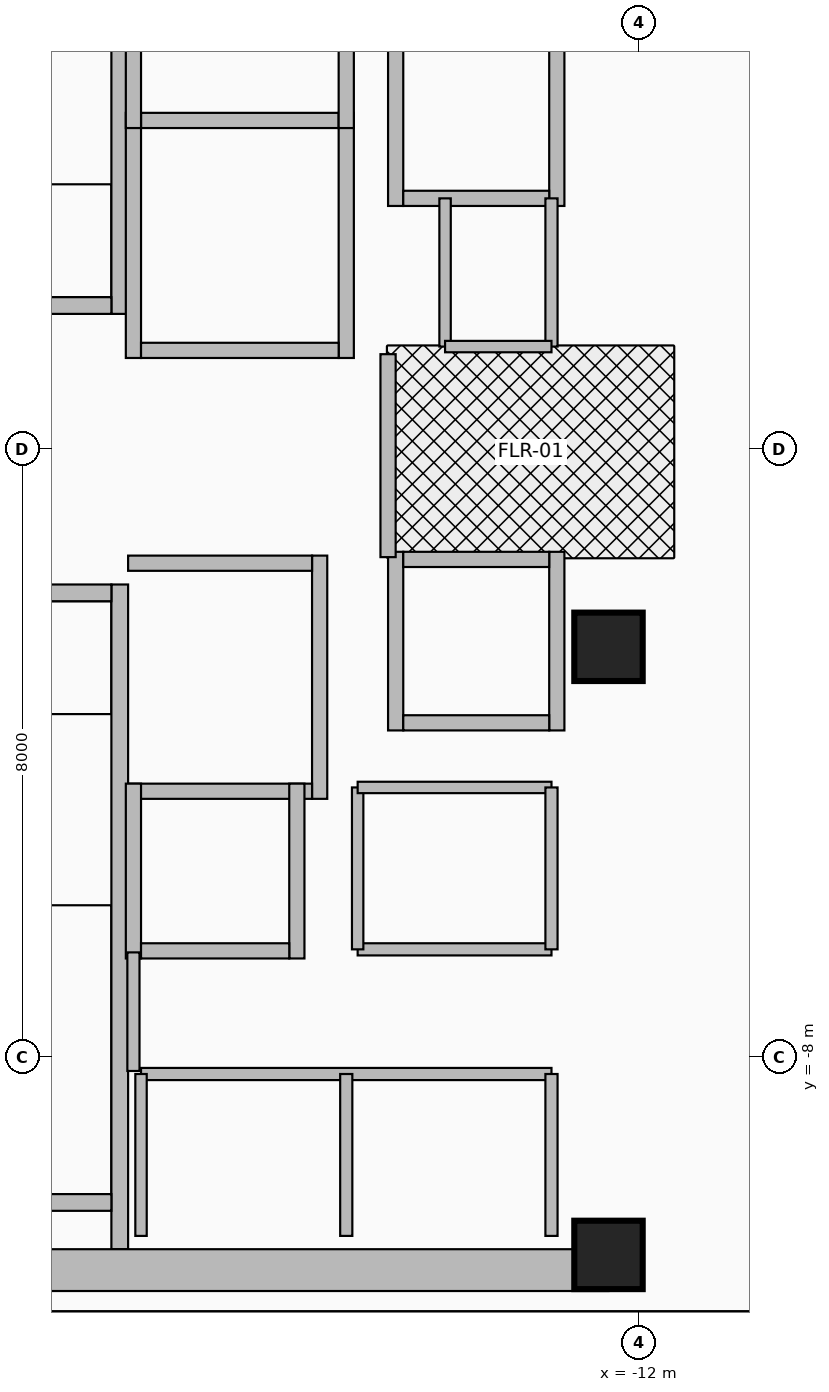
"""IFC4 building model, lengths in metres.
Left out: names, types, materials, properties, quantities, classifications, styles, units other than length and angle.
Written with IfcOpenShell. Run it as: python <this file> out.ifc"""

import sys

from ifc_helpers import new_model, si_unit, direction, frame, frame_2d, origin, origin_2d, place, context, subcontext, project, spatial, rectangle, extrude, source, transform, mapped, element, fill, save


model = new_model("IFC4")
c1 = context("Model", 3, precision=1e-05, world=origin(), true_north=direction((0.0, 1.0)))
c2 = subcontext(c1, "Body", "Model", "MODEL_VIEW")
j1 = project(units=[si_unit("LENGTHUNIT", "METRE"), si_unit("PLANEANGLEUNIT", "RADIAN")], contexts=[c1])
p1 = place(None, origin())
s1 = spatial("IfcSite", under=j1, at=p1, CompositionType="ELEMENT")
p2 = place(p1, origin())
s2 = spatial("IfcBuilding", under=s1, at=p2, CompositionType="ELEMENT")
p3 = place(p2, frame((0.0, 0.0, 209.0)))
s3 = spatial("IfcBuildingStorey", under=s2, at=p3, CompositionType="ELEMENT", Elevation=209.0)
p4 = place(p3, frame((-18.83, 1.78, 0.0), z_axis=(0.0, 0.0, 1.0), x_axis=(0.0, 1.0, 0.0)))
e1 = element("IfcWall", 1, at=p4, inside=s3, PredefinedType="SHEAR", context=c2, shape_type="SweptSolid", body=[
    extrude(rectangle(XDim=8.745, YDim=0.22, at=frame_2d((4.373, 0.0))), origin(), (0.0, 0.0, 1.0), 3.26),
])
p5 = place(p3, frame((-22.05, 1.89, 0.0), z_axis=(0.0, 0.0, 1.0), x_axis=(1.0, 0.0, 0.0)))
e2 = element("IfcWall", 2, at=p5, inside=s3, PredefinedType="SHEAR", context=c2, shape_type="SweptSolid", body=[
    extrude(rectangle(XDim=3.11, YDim=0.22, at=frame_2d((1.555, 0.0))), origin(), (0.0, 0.0, 1.0), 3.26),
])
p6 = place(p5, frame((1.0, 0.0, 0.0)))
e3 = element("IfcOpeningElement", 3, at=p6, cuts=e2, PredefinedType="OPENING", context=c2, shape_type="SweptSolid", body=[
    extrude(rectangle(XDim=1.1, YDim=2.15, at=frame_2d((0.55, 1.075))), frame((0.0, 0.125, 0.0), z_axis=(0.0, -1.0, 0.0), x_axis=(1.0, 0.0, 0.0)), (0.0, 0.0, 1.0), 0.25),
])
p7 = place(p3, frame((-18.83, -10.525, 0.0), z_axis=(0.0, 0.0, 1.0), x_axis=(0.0, 1.0, 0.0)))
e4 = element("IfcWall", 4, at=p7, inside=s3, PredefinedType="SHEAR", context=c2, shape_type="SweptSolid", body=[
    extrude(rectangle(XDim=8.745, YDim=0.22, at=frame_2d((4.373, 0.0))), origin(), (0.0, 0.0, 1.0), 3.26),
])
p8 = place(p3, frame((-22.05, -9.91, 0.0), z_axis=(0.0, 0.0, 1.0), x_axis=(1.0, 0.0, 0.0)))
e5 = element("IfcWall", 5, at=p8, inside=s3, PredefinedType="SHEAR", context=c2, shape_type="SweptSolid", body=[
    extrude(rectangle(XDim=3.11, YDim=0.22, at=frame_2d((1.555, 0.0))), origin(), (0.0, 0.0, 1.0), 3.26),
])
p9 = place(p3, frame((-22.05, -1.89, 0.0), z_axis=(0.0, 0.0, 1.0), x_axis=(1.0, 0.0, 0.0)))
e6 = element("IfcWall", 6, at=p9, inside=s3, PredefinedType="SHEAR", context=c2, shape_type="SweptSolid", body=[
    extrude(rectangle(XDim=3.11, YDim=0.22, at=frame_2d((1.555, 0.0))), origin(), (0.0, 0.0, 1.0), 3.26),
])
p10 = place(p9, frame((1.0, 0.0, 0.0)))
e7 = element("IfcOpeningElement", 7, at=p10, cuts=e6, PredefinedType="OPENING", context=c2, shape_type="SweptSolid", body=[
    extrude(rectangle(XDim=1.1, YDim=2.15, at=frame_2d((0.55, 1.075))), frame((0.0, 0.125, 0.0), z_axis=(0.0, -1.0, 0.0), x_axis=(1.0, 0.0, 0.0)), (0.0, 0.0, 1.0), 0.25),
])
p11 = place(p3, frame((-22.65, -10.8, 0.0), z_axis=(0.0, 0.0, 1.0), x_axis=(1.0, 0.0, 0.0)))
e8 = element("IfcWall", 8, at=p11, inside=s3, PredefinedType="SHEAR", context=c2, shape_type="SweptSolid", body=[
    extrude(rectangle(XDim=10.25, YDim=0.55, at=frame_2d((5.125, 0.0))), origin(), (0.0, 0.0, 1.0), 3.26),
])
m1 = source(origin(), c2, "Body", "SweptSolid", [
    extrude(rectangle(XDim=0.9, YDim=0.9, at=origin_2d()), origin(), (0.0, 0.0, 1.0), 3.5),
])
for number, where, z_axis, x_axis in (
    (9, (-12.4, -10.6, 0.0), (0.0, 0.0, 1.0), (1.0, 0.0, 0.0)),
    (10, (-12.4, -2.6, 0.0), (0.0, 0.0, 1.0), (1.0, 0.0, 0.0)),
):
    element("IfcColumn", number, at=place(p3, frame(where, z_axis=z_axis, x_axis=x_axis)), inside=s3, PredefinedType="COLUMN", context=c2, shape_type="MappedRepresentation", body=[
        mapped(m1, transform((0.0, 0.0, 0.0), x_axis=(1.0, 0.0, 0.0), y_axis=(0.0, 1.0, 0.0), z_axis=(0.0, 0.0, 1.0), scale=1.0)),
    ])
for number, where, z_axis, x_axis in (
    (11, (-18.65, 1.2, 0.0), (0.0, 0.0, 1.0), (0.0, 1.0, 0.0)),
    (12, (-15.85, 1.2, 0.0), (0.0, 0.0, 1.0), (0.0, 1.0, 0.0)),
):
    element("IfcWall", number, at=place(p3, frame(where, z_axis=z_axis, x_axis=x_axis)), inside=s3, PredefinedType="MOVABLE", context=c2, shape_type="SweptSolid", body=[
        extrude(rectangle(XDim=3.225, YDim=0.2, at=frame_2d((1.613, 0.0))), origin(), (0.0, 0.0, 1.0), 3.26),
    ])
p12 = place(p3, frame((-18.55, 1.3, 0.0), z_axis=(0.0, 0.0, 1.0), x_axis=(1.0, 0.0, 0.0)))
e13 = element("IfcWall", 13, at=p12, inside=s3, PredefinedType="MOVABLE", context=c2, shape_type="SweptSolid", body=[
    extrude(rectangle(XDim=2.6, YDim=0.2, at=frame_2d((1.3, 0.0))), origin(), (0.0, 0.0, 1.0), 3.26),
])
p13 = place(p12, frame((0.7, 0.0, 0.0)))
e14 = element("IfcOpeningElement", 14, at=p13, cuts=e13, PredefinedType="OPENING", context=c2, shape_type="SweptSolid", body=[
    extrude(rectangle(XDim=1.2, YDim=2.1, at=frame_2d((0.6, 1.05))), frame((0.0, 0.115, 0.0), z_axis=(0.0, -1.0, 0.0), x_axis=(1.0, 0.0, 0.0)), (0.0, 0.0, 1.0), 0.23),
])
p14 = place(p3, frame((-18.55, 4.325, 0.0), z_axis=(0.0, 0.0, 1.0), x_axis=(1.0, 0.0, 0.0)))
e15 = element("IfcWall", 15, at=p14, inside=s3, PredefinedType="MOVABLE", context=c2, shape_type="SweptSolid", body=[
    extrude(rectangle(XDim=2.6, YDim=0.2, at=frame_2d((1.3, 0.0))), origin(), (0.0, 0.0, 1.0), 3.26),
])
p15 = place(p3, frame((-16.2, -4.6, 0.0), z_axis=(0.0, 0.0, 1.0), x_axis=(0.0, 1.0, 0.0)))
e16 = element("IfcWall", 16, at=p15, inside=s3, PredefinedType="MOVABLE", context=c2, shape_type="SweptSolid", body=[
    extrude(rectangle(XDim=3.2, YDim=0.2, at=frame_2d((1.6, 0.0))), origin(), (0.0, 0.0, 1.0), 3.26),
])
p16 = place(p3, frame((-18.72, -4.5, 0.0), z_axis=(0.0, 0.0, 1.0), x_axis=(1.0, 0.0, 0.0)))
e17 = element("IfcWall", 17, at=p16, inside=s3, PredefinedType="MOVABLE", context=c2, shape_type="SweptSolid", body=[
    extrude(rectangle(XDim=2.42, YDim=0.2, at=frame_2d((1.21, 0.0))), origin(), (0.0, 0.0, 1.0), 3.26),
])
p17 = place(p3, frame((-18.72, -1.5, 0.0), z_axis=(0.0, 0.0, 1.0), x_axis=(1.0, 0.0, 0.0)))
e18 = element("IfcWall", 18, at=p17, inside=s3, PredefinedType="MOVABLE", context=c2, shape_type="SweptSolid", body=[
    extrude(rectangle(XDim=2.42, YDim=0.2, at=frame_2d((1.21, 0.0))), origin(), (0.0, 0.0, 1.0), 3.26),
])
p18 = place(p17, frame((0.61, 0.0, 0.0)))
e19 = element("IfcOpeningElement", 19, at=p18, cuts=e18, PredefinedType="OPENING", context=c2, shape_type="SweptSolid", body=[
    extrude(rectangle(XDim=1.2, YDim=2.1, at=frame_2d((0.6, 1.05))), frame((0.0, 0.115, 0.0), z_axis=(0.0, -1.0, 0.0), x_axis=(1.0, 0.0, 0.0)), (0.0, 0.0, 1.0), 0.23),
])
for number, where, z_axis, x_axis in (
    (20, (-18.65, 4.225, 0.0), (0.0, 0.0, 1.0), (0.0, 1.0, 0.0)),
    (21, (-15.85, 4.225, 0.0), (0.0, 0.0, 1.0), (0.0, 1.0, 0.0)),
):
    element("IfcWall", number, at=place(p3, frame(where, z_axis=z_axis, x_axis=x_axis)), inside=s3, PredefinedType="MOVABLE", context=c2, shape_type="SweptSolid", body=[
        extrude(rectangle(XDim=3.325, YDim=0.2, at=frame_2d((1.663, 0.0))), origin(), (0.0, 0.0, 1.0), 3.26),
    ])
p19 = place(p3, frame((-15.2, 3.2, 0.0), z_axis=(0.0, 0.0, 1.0), x_axis=(0.0, 1.0, 0.0)))
e22 = element("IfcWall", 22, at=p19, inside=s3, PredefinedType="MOVABLE", context=c2, shape_type="SweptSolid", body=[
    extrude(rectangle(XDim=2.25, YDim=0.2, at=frame_2d((1.125, 0.0))), origin(), (0.0, 0.0, 1.0), 3.26),
])
p20 = place(p3, frame((-13.08, 3.2, 0.0), z_axis=(0.0, 0.0, 1.0), x_axis=(0.0, 1.0, 0.0)))
e23 = element("IfcWall", 23, at=p20, inside=s3, PredefinedType="MOVABLE", context=c2, shape_type="SweptSolid", body=[
    extrude(rectangle(XDim=2.25, YDim=0.2, at=frame_2d((1.125, 0.0))), origin(), (0.0, 0.0, 1.0), 3.26),
])
p21 = place(p20, frame((0.575, 0.0, 0.0)))
e24 = element("IfcOpeningElement", 24, at=p21, cuts=e23, PredefinedType="OPENING", context=c2, shape_type="SweptSolid", body=[
    extrude(rectangle(XDim=1.1, YDim=2.1, at=frame_2d((0.55, 1.05))), frame((0.0, 0.115, 0.0), z_axis=(0.0, -1.0, 0.0), x_axis=(1.0, 0.0, 0.0)), (0.0, 0.0, 1.0), 0.23),
])
p22 = place(p3, frame((-15.1, 3.3, 0.0), z_axis=(0.0, 0.0, 1.0), x_axis=(1.0, 0.0, 0.0)))
e25 = element("IfcWall", 25, at=p22, inside=s3, PredefinedType="MOVABLE", context=c2, shape_type="SweptSolid", body=[
    extrude(rectangle(XDim=1.92, YDim=0.2, at=frame_2d((0.96, 0.0))), origin(), (0.0, 0.0, 1.0), 3.26),
])
for number, where, z_axis, x_axis in (
    (26, (-18.65, -6.7, 0.0), (0.0, 0.0, 1.0), (0.0, 1.0, 0.0)),
    (27, (-16.5, -6.7, 0.0), (0.0, 0.0, 1.0), (0.0, 1.0, 0.0)),
):
    element("IfcWall", number, at=place(p3, frame(where, z_axis=z_axis, x_axis=x_axis)), inside=s3, PredefinedType="MOVABLE", context=c2, shape_type="SweptSolid", body=[
        extrude(rectangle(XDim=2.3, YDim=0.2, at=frame_2d((1.15, 0.0))), origin(), (0.0, 0.0, 1.0), 3.26),
    ])
p23 = place(p3, frame((-18.55, -6.6, 0.0), z_axis=(0.0, 0.0, 1.0), x_axis=(1.0, 0.0, 0.0)))
e28 = element("IfcWall", 28, at=p23, inside=s3, PredefinedType="MOVABLE", context=c2, shape_type="SweptSolid", body=[
    extrude(rectangle(XDim=1.95, YDim=0.2, at=frame_2d((0.975, 0.0))), origin(), (0.0, 0.0, 1.0), 3.26),
])
p24 = place(p23, frame((0.425, 0.0, 0.0)))
e29 = element("IfcOpeningElement", 29, at=p24, cuts=e28, PredefinedType="OPENING", context=c2, shape_type="SweptSolid", body=[
    extrude(rectangle(XDim=1.1, YDim=2.1, at=frame_2d((0.55, 1.05))), frame((0.0, 0.115, 0.0), z_axis=(0.0, -1.0, 0.0), x_axis=(1.0, 0.0, 0.0)), (0.0, 0.0, 1.0), 0.23),
])
for number, where, z_axis, x_axis in (
    (30, (-15.2, -3.7, 0.0), (0.0, 0.0, 1.0), (0.0, 1.0, 0.0)),
    (31, (-13.08, -3.7, 0.0), (0.0, 0.0, 1.0), (0.0, 1.0, 0.0)),
):
    element("IfcWall", number, at=place(p3, frame(where, z_axis=z_axis, x_axis=x_axis)), inside=s3, PredefinedType="MOVABLE", context=c2, shape_type="SweptSolid", body=[
        extrude(rectangle(XDim=2.35, YDim=0.2, at=frame_2d((1.175, 0.0))), origin(), (0.0, 0.0, 1.0), 3.26),
    ])
p25 = place(p3, frame((-15.1, -3.6, 0.0), z_axis=(0.0, 0.0, 1.0), x_axis=(1.0, 0.0, 0.0)))
e32 = element("IfcWall", 32, at=p25, inside=s3, PredefinedType="MOVABLE", context=c2, shape_type="SweptSolid", body=[
    extrude(rectangle(XDim=1.92, YDim=0.2, at=frame_2d((0.96, 0.0))), origin(), (0.0, 0.0, 1.0), 3.26),
])
p26 = place(p3, frame((-15.1, -1.45, 0.0), z_axis=(0.0, 0.0, 1.0), x_axis=(1.0, 0.0, 0.0)))
e33 = element("IfcWall", 33, at=p26, inside=s3, PredefinedType="MOVABLE", context=c2, shape_type="SweptSolid", body=[
    extrude(rectangle(XDim=1.92, YDim=0.2, at=frame_2d((0.96, 0.0))), origin(), (0.0, 0.0, 1.0), 3.26),
])
p27 = place(p26, frame((0.41, 0.0, 0.0)))
e34 = element("IfcOpeningElement", 34, at=p27, cuts=e33, PredefinedType="OPENING", context=c2, shape_type="SweptSolid", body=[
    extrude(rectangle(XDim=1.1, YDim=2.1, at=frame_2d((0.55, 1.05))), frame((0.0, 0.115, 0.0), z_axis=(0.0, -1.0, 0.0), x_axis=(1.0, 0.0, 0.0)), (0.0, 0.0, 1.0), 0.23),
])
p28 = place(p3, frame((-15.3, -1.42, 0.0), z_axis=(0.0, 0.0, 1.0), x_axis=(0.0, 1.0, 0.0)))
e35 = element("IfcWall", 35, at=p28, inside=s3, PredefinedType="PARTITIONING", context=c2, shape_type="SweptSolid", body=[
    extrude(rectangle(XDim=2.67, YDim=0.2, at=frame_2d((1.335, 0.0))), origin(), (0.0, 0.0, 1.0), 3.26),
])
p29 = place(p28, frame((0.78, 0.0, 0.0)))
e36 = element("IfcOpeningElement", 36, at=p29, cuts=e35, PredefinedType="OPENING", context=c2, shape_type="SweptSolid", body=[
    extrude(rectangle(XDim=1.05, YDim=2.15, at=frame_2d((0.525, 1.075))), frame((0.0, 0.115, 0.0), z_axis=(0.0, -1.0, 0.0), x_axis=(1.0, 0.0, 0.0)), (0.0, 0.0, 1.0), 0.23),
])
p30 = place(p3, frame((-18.65, -8.18, 0.0), z_axis=(0.0, 0.0, 1.0), x_axis=(0.0, 1.0, 0.0)))
e37 = element("IfcWall", 37, at=p30, inside=s3, PredefinedType="PARTITIONING", context=c2, shape_type="SweptSolid", body=[
    extrude(rectangle(XDim=1.56, YDim=0.16, at=frame_2d((0.78, 0.0))), origin(), (0.0, 0.0, 1.0), 3.26),
])
p31 = place(p3, frame((-18.55, -8.22, 0.0), z_axis=(0.0, 0.0, 1.0), x_axis=(1.0, 0.0, 0.0)))
e38 = element("IfcWall", 38, at=p31, inside=s3, PredefinedType="PARTITIONING", context=c2, shape_type="SweptSolid", body=[
    extrude(rectangle(XDim=5.4, YDim=0.16, at=frame_2d((2.7, 0.0))), origin(), (0.0, 0.0, 1.0), 3.26),
])
p32 = place(p31, frame((0.35, 0.0, 0.0)))
e39 = element("IfcOpeningElement", 39, at=p32, cuts=e38, PredefinedType="OPENING", context=c2, shape_type="SweptSolid", body=[
    extrude(rectangle(XDim=0.85, YDim=2.05, at=frame_2d((0.425, 1.025))), frame((0.0, 0.095, 0.0), z_axis=(0.0, -1.0, 0.0), x_axis=(1.0, 0.0, 0.0)), (0.0, 0.0, 1.0), 0.19),
])
p33 = place(p31, frame((3.05, 0.0, 0.0)))
e40 = element("IfcOpeningElement", 40, at=p33, cuts=e38, PredefinedType="OPENING", context=c2, shape_type="SweptSolid", body=[
    extrude(rectangle(XDim=0.85, YDim=2.05, at=frame_2d((0.425, 1.025))), frame((0.0, 0.095, 0.0), z_axis=(0.0, -1.0, 0.0), x_axis=(1.0, 0.0, 0.0)), (0.0, 0.0, 1.0), 0.19),
])
p34 = place(p3, frame((-18.55, -10.35, 0.0), z_axis=(0.0, 0.0, 1.0), x_axis=(0.0, 1.0, 0.0)))
e41 = element("IfcWall", 41, at=p34, inside=s3, PredefinedType="PARTITIONING", context=c2, shape_type="SweptSolid", body=[
    extrude(rectangle(XDim=2.13, YDim=0.15, at=frame_2d((1.065, 0.0))), origin(), (0.0, 0.0, 1.0), 3.26),
])
for number, where, z_axis, x_axis in (
    (42, (-13.15, -10.35, 0.0), (0.0, 0.0, 1.0), (0.0, 1.0, 0.0)),
    (43, (-15.85, -10.35, 0.0), (0.0, 0.0, 1.0), (0.0, 1.0, 0.0)),
):
    element("IfcWall", number, at=place(p3, frame(where, z_axis=z_axis, x_axis=x_axis)), inside=s3, PredefinedType="PARTITIONING", context=c2, shape_type="SweptSolid", body=[
        extrude(rectangle(XDim=2.13, YDim=0.16, at=frame_2d((1.065, 0.0))), origin(), (0.0, 0.0, 1.0), 3.26),
    ])
p35 = place(p3, frame((-15.7, -6.58, 0.0), z_axis=(0.0, 0.0, 1.0), x_axis=(1.0, 0.0, 0.0)))
e44 = element("IfcWall", 44, at=p35, inside=s3, PredefinedType="PARTITIONING", context=c2, shape_type="SweptSolid", body=[
    extrude(rectangle(XDim=2.55, YDim=0.16, at=frame_2d((1.275, 0.0))), origin(), (0.0, 0.0, 1.0), 3.26),
])
p36 = place(p35, frame((0.5, 0.0, 0.0)))
e45 = element("IfcOpeningElement", 45, at=p36, cuts=e44, PredefinedType="OPENING", context=c2, shape_type="SweptSolid", body=[
    extrude(rectangle(XDim=0.85, YDim=2.05, at=frame_2d((0.425, 1.025))), frame((0.0, 0.095, 0.0), z_axis=(0.0, -1.0, 0.0), x_axis=(1.0, 0.0, 0.0)), (0.0, 0.0, 1.0), 0.19),
])
p37 = place(p3, frame((-15.7, -6.58, 0.0), z_axis=(0.0, 0.0, 1.0), x_axis=(0.0, 1.0, 0.0)))
e46 = element("IfcWall", 46, at=p37, inside=s3, PredefinedType="PARTITIONING", context=c2, shape_type="SweptSolid", body=[
    extrude(rectangle(XDim=2.13, YDim=0.15, at=frame_2d((1.065, 0.0))), origin(), (0.0, 0.0, 1.0), 3.26),
])
p38 = place(p3, frame((-15.7, -4.45, 0.0), z_axis=(0.0, 0.0, 1.0), x_axis=(1.0, 0.0, 0.0)))
e47 = element("IfcWall", 47, at=p38, inside=s3, PredefinedType="PARTITIONING", context=c2, shape_type="SweptSolid", body=[
    extrude(rectangle(XDim=2.55, YDim=0.15, at=frame_2d((1.275, 0.0))), origin(), (0.0, 0.0, 1.0), 3.26),
])
p39 = place(p3, frame((-13.15, -6.58, 0.0), z_axis=(0.0, 0.0, 1.0), x_axis=(0.0, 1.0, 0.0)))
e48 = element("IfcWall", 48, at=p39, inside=s3, PredefinedType="PARTITIONING", context=c2, shape_type="SweptSolid", body=[
    extrude(rectangle(XDim=2.13, YDim=0.16, at=frame_2d((1.065, 0.0))), origin(), (0.0, 0.0, 1.0), 3.26),
])
p40 = place(p3, frame((-13.15, 1.35, 0.0), z_axis=(0.0, 0.0, 1.0), x_axis=(0.0, 1.0, 0.0)))
e49 = element("IfcWall", 49, at=p40, inside=s3, PredefinedType="PARTITIONING", context=c2, shape_type="SweptSolid", body=[
    extrude(rectangle(XDim=1.95, YDim=0.16, at=frame_2d((0.975, 0.0))), origin(), (0.0, 0.0, 1.0), 3.26),
])
p41 = place(p3, frame((-14.55, 1.35, 0.0), z_axis=(0.0, 0.0, 1.0), x_axis=(0.0, 1.0, 0.0)))
e50 = element("IfcWall", 50, at=p41, inside=s3, PredefinedType="PARTITIONING", context=c2, shape_type="SweptSolid", body=[
    extrude(rectangle(XDim=1.95, YDim=0.15, at=frame_2d((0.975, 0.0))), origin(), (0.0, 0.0, 1.0), 3.26),
])
p42 = place(p3, frame((-14.55, 1.35, 0.0), z_axis=(0.0, 0.0, 1.0), x_axis=(1.0, 0.0, 0.0)))
e51 = element("IfcWall", 51, at=p42, inside=s3, PredefinedType="PARTITIONING", context=c2, shape_type="SweptSolid", body=[
    extrude(rectangle(XDim=1.4, YDim=0.15, at=frame_2d((0.7, 0.0))), origin(), (0.0, 0.0, 1.0), 3.26),
])
p43 = place(p42, frame((0.275, 0.0, 0.0)))
e52 = element("IfcOpeningElement", 52, at=p43, cuts=e51, PredefinedType="OPENING", context=c2, shape_type="SweptSolid", body=[
    extrude(rectangle(XDim=0.85, YDim=2.05, at=frame_2d((0.425, 1.025))), frame((0.0, 0.09, 0.0), z_axis=(0.0, -1.0, 0.0), x_axis=(1.0, 0.0, 0.0)), (0.0, 0.0, 1.0), 0.18),
])
p44 = place(p3, frame((-23.45, -11.42, 0.0), z_axis=(0.0, 0.0, 1.0), x_axis=(1.0, 0.0, 0.0)))
e53 = element("IfcWall", 53, at=p44, inside=s3, PredefinedType="PARTITIONING", context=c2, shape_type="SweptSolid", body=[
    extrude(rectangle(XDim=13.84, YDim=0.16, at=frame_2d((6.92, 0.0))), origin(), (0.0, 0.0, 1.0), 2.634),
])
p45 = place(p13, origin())
e54 = element("IfcDoor", 54, at=p45, inside=s3, OperationType="DOUBLE_DOOR_SLIDING", PredefinedType="DOOR", context=c2, shape_type="SweptSolid", body=[
    extrude(rectangle(XDim=1.2, YDim=2.1, at=frame_2d((0.6, 1.05))), frame((0.0, 0.025, 0.0), z_axis=(0.0, -1.0, 0.0), x_axis=(1.0, 0.0, 0.0)), (0.0, 0.0, 1.0), 0.05),
])
fill(e14, e54)
p46 = place(p18, origin())
e55 = element("IfcDoor", 55, at=p46, inside=s3, OperationType="DOUBLE_DOOR_SLIDING", PredefinedType="DOOR", context=c2, shape_type="SweptSolid", body=[
    extrude(rectangle(XDim=1.2, YDim=2.1, at=frame_2d((0.6, 1.05))), frame((0.0, 0.025, 0.0), z_axis=(0.0, -1.0, 0.0), x_axis=(1.0, 0.0, 0.0)), (0.0, 0.0, 1.0), 0.05),
])
fill(e19, e55)
p47 = place(p21, origin())
e56 = element("IfcDoor", 56, at=p47, inside=s3, OperationType="DOUBLE_DOOR_SLIDING", PredefinedType="DOOR", context=c2, shape_type="SweptSolid", body=[
    extrude(rectangle(XDim=1.1, YDim=2.1, at=frame_2d((0.55, 1.05))), frame((0.0, 0.025, 0.0), z_axis=(0.0, -1.0, 0.0), x_axis=(1.0, 0.0, 0.0)), (0.0, 0.0, 1.0), 0.05),
])
fill(e24, e56)
p48 = place(p24, origin())
e57 = element("IfcDoor", 57, at=p48, inside=s3, OperationType="DOUBLE_DOOR_SLIDING", PredefinedType="DOOR", context=c2, shape_type="SweptSolid", body=[
    extrude(rectangle(XDim=1.1, YDim=2.1, at=frame_2d((0.55, 1.05))), frame((0.0, 0.025, 0.0), z_axis=(0.0, -1.0, 0.0), x_axis=(1.0, 0.0, 0.0)), (0.0, 0.0, 1.0), 0.05),
])
fill(e29, e57)
p49 = place(p27, origin())
e58 = element("IfcDoor", 58, at=p49, inside=s3, OperationType="DOUBLE_DOOR_SLIDING", PredefinedType="DOOR", context=c2, shape_type="SweptSolid", body=[
    extrude(rectangle(XDim=1.1, YDim=2.1, at=frame_2d((0.55, 1.05))), frame((0.0, 0.025, 0.0), z_axis=(0.0, -1.0, 0.0), x_axis=(1.0, 0.0, 0.0)), (0.0, 0.0, 1.0), 0.05),
])
fill(e34, e58)
p50 = place(p29, origin())
e59 = element("IfcDoor", 59, at=p50, inside=s3, OperationType="SINGLE_SWING_RIGHT", PredefinedType="DOOR", context=c2, shape_type="SweptSolid", body=[
    extrude(rectangle(XDim=1.05, YDim=2.15, at=frame_2d((0.525, 1.075))), frame((0.0, 0.025, 0.0), z_axis=(0.0, -1.0, 0.0), x_axis=(1.0, 0.0, 0.0)), (0.0, 0.0, 1.0), 0.05),
])
fill(e36, e59)
p51 = place(p32, origin())
e60 = element("IfcDoor", 60, at=p51, inside=s3, OperationType="SINGLE_SWING_RIGHT", PredefinedType="DOOR", context=c2, shape_type="SweptSolid", body=[
    extrude(rectangle(XDim=0.85, YDim=2.05, at=frame_2d((0.425, 1.025))), frame((0.0, 0.025, 0.0), z_axis=(0.0, -1.0, 0.0), x_axis=(1.0, 0.0, 0.0)), (0.0, 0.0, 1.0), 0.05),
])
fill(e39, e60)
p52 = place(p33, origin())
e61 = element("IfcDoor", 61, at=p52, inside=s3, OperationType="SINGLE_SWING_LEFT", PredefinedType="DOOR", context=c2, shape_type="SweptSolid", body=[
    extrude(rectangle(XDim=0.85, YDim=2.05, at=frame_2d((0.425, 1.025))), frame((0.0, 0.025, 0.0), z_axis=(0.0, -1.0, 0.0), x_axis=(1.0, 0.0, 0.0)), (0.0, 0.0, 1.0), 0.05),
])
fill(e40, e61)
p53 = place(p36, origin())
e62 = element("IfcDoor", 62, at=p53, inside=s3, OperationType="SINGLE_SWING_RIGHT", PredefinedType="DOOR", context=c2, shape_type="SweptSolid", body=[
    extrude(rectangle(XDim=0.85, YDim=2.05, at=frame_2d((0.425, 1.025))), frame((0.0, 0.025, 0.0), z_axis=(0.0, -1.0, 0.0), x_axis=(1.0, 0.0, 0.0)), (0.0, 0.0, 1.0), 0.05),
])
fill(e45, e62)
p54 = place(p43, origin())
e63 = element("IfcDoor", 63, at=p54, inside=s3, OperationType="SINGLE_SWING_LEFT", PredefinedType="DOOR", context=c2, shape_type="SweptSolid", body=[
    extrude(rectangle(XDim=0.85, YDim=2.05, at=frame_2d((0.425, 1.025))), frame((0.0, 0.025, 0.0), z_axis=(0.0, -1.0, 0.0), x_axis=(1.0, 0.0, 0.0)), (0.0, 0.0, 1.0), 0.05),
])
fill(e52, e63)
save(model, sys.argv[1])
